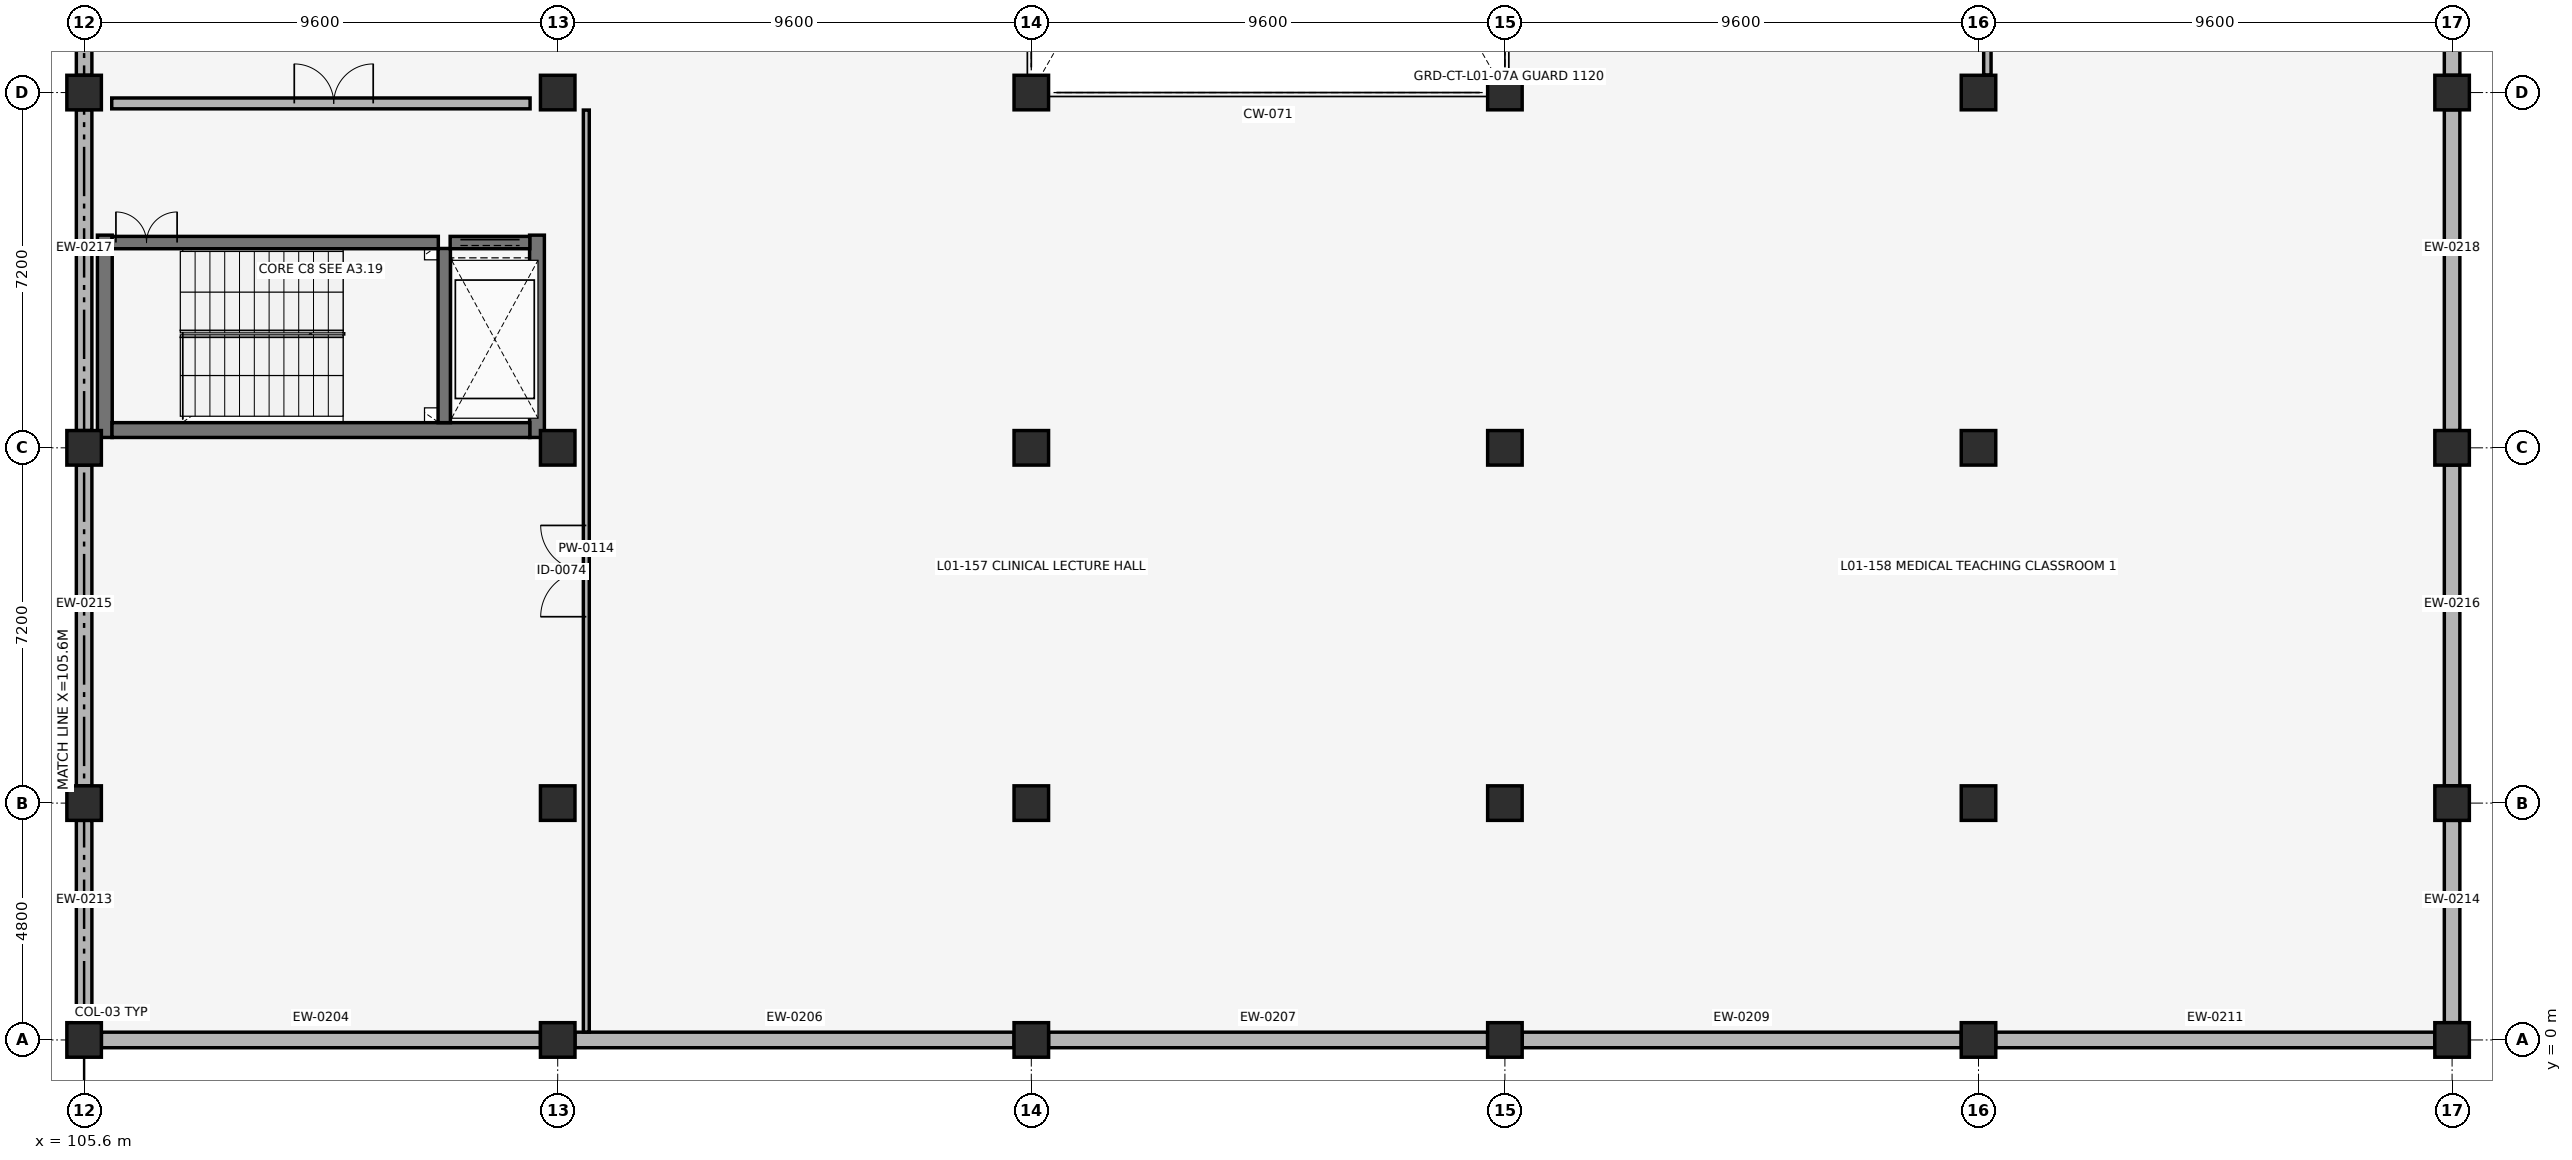
"""IFC4 building model, lengths in metres.
Left out: names, types, materials, properties, quantities, classifications, styles, units other than length and angle.
Written with IfcOpenShell. Run it as: python <this file> out.ifc"""

import sys

from ifc_helpers import new_model, si_unit, direction, frame, frame_2d, origin, origin_2d, place, context, subcontext, project, spatial, rectangle, extrude, element, fill, save


model = new_model("IFC4")
c1 = context("Model", 3, precision=1e-05, world=origin(), true_north=direction((0.0, 1.0)))
c2 = subcontext(c1, "Body", "Model", "MODEL_VIEW")
j1 = project(units=[si_unit("LENGTHUNIT", "METRE"), si_unit("PLANEANGLEUNIT", "RADIAN")], contexts=[c1])
p1 = place(None, origin())
s1 = spatial("IfcSite", under=j1, at=p1, CompositionType="ELEMENT")
p2 = place(p1, origin())
s2 = spatial("IfcBuilding", under=s1, at=p2, CompositionType="ELEMENT")
p3 = place(p2, frame((0.0, 0.0, 4.42)))
s3 = spatial("IfcBuildingStorey", under=s2, at=p3, CompositionType="ELEMENT", Elevation=4.42)
for number, where, z_axis, x_axis in (
    (1, (105.6, 0.0, 0.0), (0.0, 0.0, 1.0), (1.0, 0.0, 0.0)),
    (2, (105.6, 4.8, 0.0), (0.0, 0.0, 1.0), (1.0, 0.0, 0.0)),
    (3, (105.6, 12.0, 0.0), (0.0, 0.0, 1.0), (1.0, 0.0, 0.0)),
    (4, (105.6, 19.2, 0.0), (0.0, 0.0, 1.0), (1.0, 0.0, 0.0)),
    (5, (115.2, 0.0, 0.0), (0.0, 0.0, 1.0), (1.0, 0.0, 0.0)),
    (6, (115.2, 4.8, 0.0), (0.0, 0.0, 1.0), (1.0, 0.0, 0.0)),
    (7, (115.2, 12.0, 0.0), (0.0, 0.0, 1.0), (1.0, 0.0, 0.0)),
    (8, (115.2, 19.2, 0.0), (0.0, 0.0, 1.0), (1.0, 0.0, 0.0)),
    (9, (124.8, 0.0, 0.0), (0.0, 0.0, 1.0), (1.0, 0.0, 0.0)),
    (10, (124.8, 4.8, 0.0), (0.0, 0.0, 1.0), (1.0, 0.0, 0.0)),
    (11, (124.8, 12.0, 0.0), (0.0, 0.0, 1.0), (1.0, 0.0, 0.0)),
    (12, (124.8, 19.2, 0.0), (0.0, 0.0, 1.0), (1.0, 0.0, 0.0)),
    (13, (134.4, 0.0, 0.0), (0.0, 0.0, 1.0), (1.0, 0.0, 0.0)),
    (14, (134.4, 4.8, 0.0), (0.0, 0.0, 1.0), (1.0, 0.0, 0.0)),
    (15, (134.4, 12.0, 0.0), (0.0, 0.0, 1.0), (1.0, 0.0, 0.0)),
    (16, (134.4, 19.2, 0.0), (0.0, 0.0, 1.0), (1.0, 0.0, 0.0)),
    (17, (144.0, 0.0, 0.0), (0.0, 0.0, 1.0), (1.0, 0.0, 0.0)),
    (18, (144.0, 4.8, 0.0), (0.0, 0.0, 1.0), (1.0, 0.0, 0.0)),
    (19, (144.0, 12.0, 0.0), (0.0, 0.0, 1.0), (1.0, 0.0, 0.0)),
    (20, (144.0, 19.2, 0.0), (0.0, 0.0, 1.0), (1.0, 0.0, 0.0)),
    (21, (153.6, 0.0, 0.0), (0.0, 0.0, 1.0), (1.0, 0.0, 0.0)),
    (22, (153.6, 4.8, 0.0), (0.0, 0.0, 1.0), (1.0, 0.0, 0.0)),
    (23, (153.6, 12.0, 0.0), (0.0, 0.0, 1.0), (1.0, 0.0, 0.0)),
    (24, (153.6, 19.2, 0.0), (0.0, 0.0, 1.0), (1.0, 0.0, 0.0)),
):
    element("IfcColumn", number, at=place(p3, frame(where, z_axis=z_axis, x_axis=x_axis)), inside=s3, PredefinedType="COLUMN", context=c2, shape_type="SweptSolid", body=[
        extrude(rectangle(XDim=0.7, YDim=0.7, at=origin_2d()), origin(), (0.0, 0.0, 1.0), 4.08),
    ])
p4 = place(p3, frame((105.95, 0.0, 0.0), z_axis=(0.0, 0.0, 1.0), x_axis=(1.0, 0.0, 0.0)))
e25 = element("IfcWall", 25, at=p4, inside=s3, PredefinedType="SOLIDWALL", context=c2, shape_type="SweptSolid", body=[
    extrude(rectangle(XDim=8.9, YDim=0.315, at=frame_2d((4.45, 0.0))), origin(), (0.0, 0.0, 1.0), 3.06),
])
p5 = place(p3, frame((115.55, 0.0, 0.0), z_axis=(0.0, 0.0, 1.0), x_axis=(1.0, 0.0, 0.0)))
e26 = element("IfcWall", 26, at=p5, inside=s3, PredefinedType="SOLIDWALL", context=c2, shape_type="SweptSolid", body=[
    extrude(rectangle(XDim=8.9, YDim=0.315, at=frame_2d((4.45, 0.0))), origin(), (0.0, 0.0, 1.0), 3.06),
])
p6 = place(p3, frame((125.15, 0.0, 0.0), z_axis=(0.0, 0.0, 1.0), x_axis=(1.0, 0.0, 0.0)))
e27 = element("IfcWall", 27, at=p6, inside=s3, PredefinedType="SOLIDWALL", context=c2, shape_type="SweptSolid", body=[
    extrude(rectangle(XDim=8.9, YDim=0.315, at=frame_2d((4.45, 0.0))), origin(), (0.0, 0.0, 1.0), 3.06),
])
for number, where, z_axis, x_axis in (
    (28, (134.75, 0.0, 0.0), (0.0, 0.0, 1.0), (1.0, 0.0, 0.0)),
    (29, (144.35, 0.0, 0.0), (0.0, 0.0, 1.0), (1.0, 0.0, 0.0)),
):
    element("IfcWall", number, at=place(p3, frame(where, z_axis=z_axis, x_axis=x_axis)), inside=s3, PredefinedType="SOLIDWALL", context=c2, shape_type="SweptSolid", body=[
        extrude(rectangle(XDim=8.9, YDim=0.315, at=frame_2d((4.45, 0.0))), origin(), (0.0, 0.0, 1.0), 3.06),
    ])
for number, where, z_axis, x_axis in (
    (30, (105.6, 4.45, 0.0), (0.0, 0.0, 1.0), (0.0, -1.0, 0.0)),
    (31, (153.6, 0.35, 0.0), (0.0, 0.0, 1.0), (0.0, 1.0, 0.0)),
):
    element("IfcWall", number, at=place(p3, frame(where, z_axis=z_axis, x_axis=x_axis)), inside=s3, PredefinedType="SOLIDWALL", context=c2, shape_type="SweptSolid", body=[
        extrude(rectangle(XDim=4.1, YDim=0.315, at=frame_2d((2.05, 0.0))), origin(), (0.0, 0.0, 1.0), 3.06),
    ])
for number, where, z_axis, x_axis in (
    (32, (105.6, 11.65, 0.0), (0.0, 0.0, 1.0), (0.0, -1.0, 0.0)),
    (33, (153.6, 5.15, 0.0), (0.0, 0.0, 1.0), (0.0, 1.0, 0.0)),
    (34, (105.6, 18.85, 0.0), (0.0, 0.0, 1.0), (0.0, -1.0, 0.0)),
    (35, (153.6, 12.35, 0.0), (0.0, 0.0, 1.0), (0.0, 1.0, 0.0)),
    (36, (105.6, 26.05, 0.0), (0.0, 0.0, 1.0), (0.0, -1.0, 0.0)),
    (37, (153.6, 19.55, 0.0), (0.0, 0.0, 1.0), (0.0, 1.0, 0.0)),
):
    element("IfcWall", number, at=place(p3, frame(where, z_axis=z_axis, x_axis=x_axis)), inside=s3, PredefinedType="SOLIDWALL", context=c2, shape_type="SweptSolid", body=[
        extrude(rectangle(XDim=6.5, YDim=0.315, at=frame_2d((3.25, 0.0))), origin(), (0.0, 0.0, 1.0), 3.06),
    ])
for number, where, z_axis, x_axis in (
    (38, (106.02, 12.21, 0.0), (0.0, 0.0, 1.0), (0.0, 1.0, 0.0)),
    (39, (114.78, 12.21, 0.0), (0.0, 0.0, 1.0), (0.0, 1.0, 0.0)),
):
    element("IfcWall", number, at=place(p3, frame(where, z_axis=z_axis, x_axis=x_axis)), inside=s3, PredefinedType="SHEAR", context=c2, shape_type="SweptSolid", body=[
        extrude(rectangle(XDim=4.1, YDim=0.3, at=frame_2d((2.05, 0.0))), origin(), (0.0, 0.0, 1.0), 3.78),
    ])
p7 = place(p3, frame((106.165, 12.36, 0.0), z_axis=(0.0, 0.0, 1.0), x_axis=(1.0, 0.0, 0.0)))
e40 = element("IfcWall", 40, at=p7, inside=s3, PredefinedType="SHEAR", context=c2, shape_type="SweptSolid", body=[
    extrude(rectangle(XDim=8.47, YDim=0.3, at=frame_2d((4.235, 0.0))), origin(), (0.0, 0.0, 1.0), 3.78),
])
p8 = place(p3, frame((112.9, 12.51, 0.0), z_axis=(0.0, 0.0, 1.0), x_axis=(0.0, 1.0, 0.0)))
e41 = element("IfcWall", 41, at=p8, inside=s3, PredefinedType="SHEAR", context=c2, shape_type="SweptSolid", body=[
    extrude(rectangle(XDim=3.53, YDim=0.25, at=frame_2d((1.765, 0.0))), origin(), (0.0, 0.0, 1.0), 3.78),
])
p9 = place(p3, frame((106.165, 16.16, 0.0), z_axis=(0.0, 0.0, 1.0), x_axis=(1.0, 0.0, 0.0)))
e42 = element("IfcWall", 42, at=p9, inside=s3, PredefinedType="SHEAR", context=c2, shape_type="SweptSolid", body=[
    extrude(rectangle(XDim=6.615, YDim=0.25, at=frame_2d((3.308, 0.0))), origin(), (0.0, 0.0, 1.0), 3.78),
])
p10 = place(p9, frame((0.08, 0.0, 0.0)))
e43 = element("IfcOpeningElement", 43, at=p10, cuts=e42, PredefinedType="OPENING", context=c2, shape_type="SweptSolid", body=[
    extrude(rectangle(XDim=1.24, YDim=2.15, at=frame_2d((0.62, 1.075))), frame((0.0, 0.135, 0.0), z_axis=(0.0, -1.0, 0.0), x_axis=(1.0, 0.0, 0.0)), (0.0, 0.0, 1.0), 0.27),
])
p11 = place(p3, frame((106.16, 18.98, 0.0), z_axis=(0.0, 0.0, 1.0), x_axis=(1.0, 0.0, 0.0)))
e44 = element("IfcWall", 44, at=p11, inside=s3, PredefinedType="PARTITIONING", context=c2, shape_type="SweptSolid", body=[
    extrude(rectangle(XDim=8.48, YDim=0.22, at=frame_2d((4.24, 0.0))), origin(), (0.0, 0.0, 1.0), 3.06),
])
p12 = place(p11, frame((3.7, 0.0, 0.0)))
e45 = element("IfcOpeningElement", 45, at=p12, cuts=e44, PredefinedType="OPENING", context=c2, shape_type="SweptSolid", body=[
    extrude(rectangle(XDim=1.6, YDim=2.2, at=frame_2d((0.8, 1.1))), frame((0.0, 0.12, 0.0), z_axis=(0.0, -1.0, 0.0), x_axis=(1.0, 0.0, 0.0)), (0.0, 0.0, 1.0), 0.24),
])
p13 = place(p3, frame((113.02, 16.16, 0.0), z_axis=(0.0, 0.0, 1.0), x_axis=(1.0, 0.0, 0.0)))
e46 = element("IfcWall", 46, at=p13, inside=s3, PredefinedType="SHEAR", context=c2, shape_type="SweptSolid", body=[
    extrude(rectangle(XDim=1.615, YDim=0.25, at=frame_2d((0.808, 0.0))), origin(), (0.0, 0.0, 1.0), 3.78),
])
p14 = place(p13, frame((0.208, 0.0, 0.0)))
e47 = element("IfcOpeningElement", 47, at=p14, cuts=e46, PredefinedType="OPENING", context=c2, shape_type="SweptSolid", body=[
    extrude(rectangle(XDim=1.2, YDim=2.15, at=frame_2d((0.6, 1.075))), frame((0.0, 0.135, 0.0), z_axis=(0.0, -1.0, 0.0), x_axis=(1.0, 0.0, 0.0)), (0.0, 0.0, 1.0), 0.27),
])
p15 = place(p3, frame((115.78, 0.159, 0.0), z_axis=(0.0, 0.0, 1.0), x_axis=(0.0, 1.0, 0.0)))
e48 = element("IfcWall", 48, at=p15, inside=s3, PredefinedType="PARTITIONING", context=c2, shape_type="SweptSolid", body=[
    extrude(rectangle(XDim=18.686, YDim=0.12, at=frame_2d((9.343, 0.0))), origin(), (0.0, 0.0, 1.0), 3.06),
])
p16 = place(p15, frame((8.418, 0.0, 0.0)))
e49 = element("IfcOpeningElement", 49, at=p16, cuts=e48, PredefinedType="OPENING", context=c2, shape_type="SweptSolid", body=[
    extrude(rectangle(XDim=1.85, YDim=2.18, at=frame_2d((0.925, 1.09))), frame((0.0, 0.07, 0.0), z_axis=(0.0, -1.0, 0.0), x_axis=(1.0, 0.0, 0.0)), (0.0, 0.0, 1.0), 0.14),
])
p17 = place(p3, frame((144.18, 19.555, 0.0), z_axis=(0.0, 0.0, 1.0), x_axis=(0.0, 1.0, 0.0)))
e50 = element("IfcWall", 50, at=p17, inside=s3, PredefinedType="PARTITIONING", context=c2, shape_type="SweptSolid", body=[
    extrude(rectangle(XDim=6.49, YDim=0.15, at=frame_2d((3.245, 0.0))), origin(), (0.0, 0.0, 1.0), 3.11),
])
p18 = place(p17, frame((2.62, 0.0, 0.0)))
e51 = element("IfcOpeningElement", 51, at=p18, cuts=e50, PredefinedType="OPENING", context=c2, shape_type="SweptSolid", body=[
    extrude(rectangle(XDim=1.25, YDim=2.12, at=frame_2d((0.625, 1.06))), frame((0.0, 0.085, 0.0), z_axis=(0.0, -1.0, 0.0), x_axis=(1.0, 0.0, 0.0)), (0.0, 0.0, 1.0), 0.17),
])
p19 = place(p10, origin())
e52 = element("IfcDoor", 52, at=p19, inside=s3, OperationType="DOUBLE_DOOR_SINGLE_SWING", PredefinedType="DOOR", context=c2, shape_type="SweptSolid", body=[
    extrude(rectangle(XDim=1.24, YDim=2.15, at=frame_2d((0.62, 1.075))), frame((0.0, 0.025, 0.0), z_axis=(0.0, -1.0, 0.0), x_axis=(1.0, 0.0, 0.0)), (0.0, 0.0, 1.0), 0.05),
])
fill(e43, e52)
p20 = place(p12, origin())
e53 = element("IfcDoor", 53, at=p20, inside=s3, OperationType="DOUBLE_DOOR_SINGLE_SWING", PredefinedType="DOOR", context=c2, shape_type="SweptSolid", body=[
    extrude(rectangle(XDim=1.6, YDim=2.2, at=frame_2d((0.8, 1.1))), frame((0.0, 0.025, 0.0), z_axis=(0.0, -1.0, 0.0), x_axis=(1.0, 0.0, 0.0)), (0.0, 0.0, 1.0), 0.05),
])
fill(e45, e53)
p21 = place(p14, origin())
e54 = element("IfcDoor", 54, at=p21, inside=s3, OperationType="DOUBLE_DOOR_SLIDING", PredefinedType="DOOR", context=c2, shape_type="SweptSolid", body=[
    extrude(rectangle(XDim=1.2, YDim=2.15, at=frame_2d((0.6, 1.075))), frame((0.0, 0.025, 0.0), z_axis=(0.0, -1.0, 0.0), x_axis=(1.0, 0.0, 0.0)), (0.0, 0.0, 1.0), 0.05),
])
fill(e47, e54)
p22 = place(p16, origin())
e55 = element("IfcDoor", 55, at=p22, inside=s3, OperationType="DOUBLE_DOOR_SINGLE_SWING", PredefinedType="DOOR", context=c2, shape_type="SweptSolid", body=[
    extrude(rectangle(XDim=1.85, YDim=2.18, at=frame_2d((0.925, 1.09))), frame((0.0, 0.025, 0.0), z_axis=(0.0, -1.0, 0.0), x_axis=(1.0, 0.0, 0.0)), (0.0, 0.0, 1.0), 0.05),
])
fill(e49, e55)
save(model, sys.argv[1])
